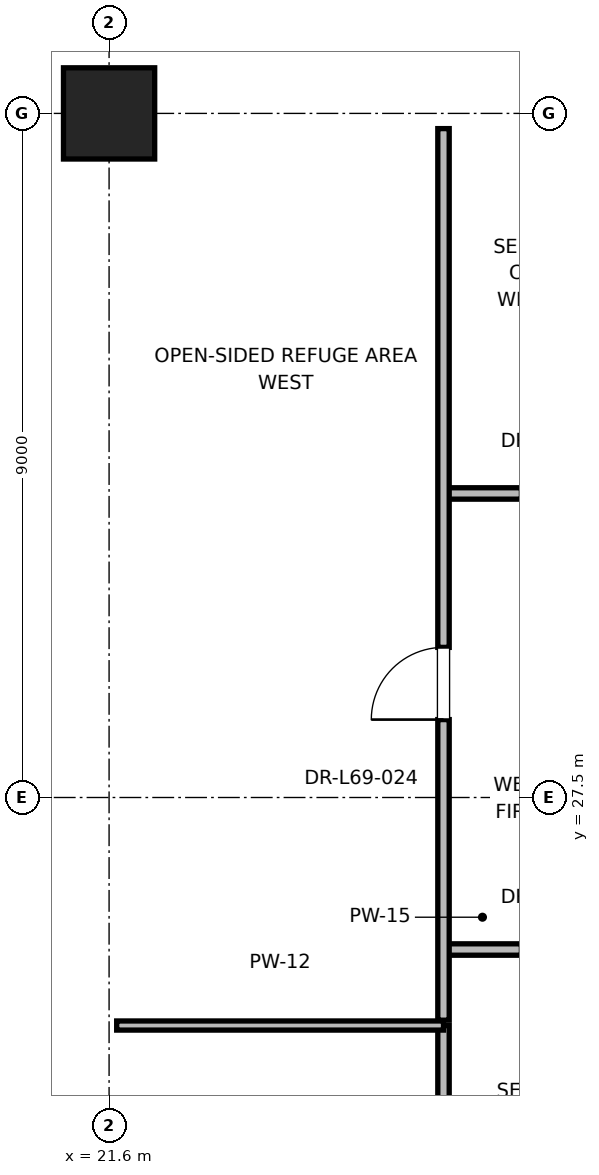
"""IFC4 building model, lengths in metres.
Left out: names, types, materials, properties, quantities, classifications, styles, units other than length and angle.
Written with IfcOpenShell. Run it as: python <this file> out.ifc"""

import sys

from ifc_helpers import new_model, si_unit, direction, frame, frame_2d, origin, origin_2d, place, context, subcontext, project, spatial, rectangle, extrude, element, fill, save


model = new_model("IFC4")
c1 = context("Model", 3, precision=1e-05, world=origin(), true_north=direction((0.0, 1.0)))
c2 = subcontext(c1, "Body", "Model", "MODEL_VIEW")
j1 = project(units=[si_unit("LENGTHUNIT", "METRE"), si_unit("PLANEANGLEUNIT", "RADIAN")], contexts=[c1])
p1 = place(None, origin())
s1 = spatial("IfcSite", under=j1, at=p1, CompositionType="ELEMENT")
p2 = place(p1, origin())
s2 = spatial("IfcBuilding", under=s1, at=p2, CompositionType="ELEMENT")
p3 = place(p2, frame((0.0, 0.0, 295.2)))
s3 = spatial("IfcBuildingStorey", under=s2, at=p3, CompositionType="ELEMENT", Elevation=295.2)
p4 = place(p3, frame((21.6, 36.5, 0.0), z_axis=(0.0, 0.0, 1.0), x_axis=(1.0, 0.0, 0.0)))
e1 = element("IfcColumn", 1, at=p4, inside=s3, PredefinedType="COLUMN", context=c2, shape_type="SweptSolid", body=[
    extrude(rectangle(XDim=1.2, YDim=1.2, at=origin_2d()), origin(), (0.0, 0.0, 1.0), 5.8),
])
p5 = place(p3, frame((26.0, 25.5, 0.0), z_axis=(0.0, 0.0, 1.0), x_axis=(1.0, 0.0, 0.0)))
e2 = element("IfcWall", 2, at=p5, inside=s3, PredefinedType="PARTITIONING", context=c2, shape_type="SweptSolid", body=[
    extrude(rectangle(XDim=3.0, YDim=0.15, at=frame_2d((1.5, 0.0))), origin(), (0.0, 0.0, 1.0), 2.85),
])
p6 = place(p5, frame((1.025, 0.0, 0.0)))
e3 = element("IfcOpeningElement", 3, at=p6, cuts=e2, PredefinedType="OPENING", context=c2, shape_type="SweptSolid", body=[
    extrude(rectangle(XDim=0.95, YDim=2.15, at=frame_2d((0.475, 1.075))), frame((0.0, 0.075, 0.0), z_axis=(0.0, -1.0, 0.0), x_axis=(1.0, 0.0, 0.0)), (0.0, 0.0, 1.0), 0.15),
])
p7 = place(p3, frame((26.0, 31.5, 0.0), z_axis=(0.0, 0.0, 1.0), x_axis=(1.0, 0.0, 0.0)))
e4 = element("IfcWall", 4, at=p7, inside=s3, PredefinedType="PARTITIONING", context=c2, shape_type="SweptSolid", body=[
    extrude(rectangle(XDim=3.0, YDim=0.15, at=frame_2d((1.5, 0.0))), origin(), (0.0, 0.0, 1.0), 2.85),
])
p8 = place(p7, frame((1.025, 0.0, 0.0)))
e5 = element("IfcOpeningElement", 5, at=p8, cuts=e4, PredefinedType="OPENING", context=c2, shape_type="SweptSolid", body=[
    extrude(rectangle(XDim=0.95, YDim=2.15, at=frame_2d((0.475, 1.075))), frame((0.0, 0.075, 0.0), z_axis=(0.0, -1.0, 0.0), x_axis=(1.0, 0.0, 0.0)), (0.0, 0.0, 1.0), 0.15),
])
p9 = place(p3, frame((26.0, 18.7, 0.0), z_axis=(0.0, 0.0, 1.0), x_axis=(0.0, 1.0, 0.0)))
e6 = element("IfcWall", 6, at=p9, inside=s3, PredefinedType="PARTITIONING", context=c2, shape_type="SweptSolid", body=[
    extrude(rectangle(XDim=5.8, YDim=0.15, at=frame_2d((2.9, 0.0))), origin(), (0.0, 0.0, 1.0), 2.85),
])
p10 = place(p9, frame((2.065, 0.0, 0.0)))
e7 = element("IfcOpeningElement", 7, at=p10, cuts=e6, PredefinedType="OPENING", context=c2, shape_type="SweptSolid", body=[
    extrude(rectangle(XDim=1.6, YDim=2.25, at=frame_2d((0.8, 1.125))), frame((0.0, 0.075, 0.0), z_axis=(0.0, -1.0, 0.0), x_axis=(1.0, 0.0, 0.0)), (0.0, 0.0, 1.0), 0.15),
])
p11 = place(p3, frame((21.7, 24.5, 0.0), z_axis=(0.0, 0.0, 1.0), x_axis=(1.0, 0.0, 0.0)))
e8 = element("IfcWall", 8, at=p11, inside=s3, PredefinedType="PARTITIONING", context=c2, shape_type="SweptSolid", body=[
    extrude(rectangle(XDim=4.3, YDim=0.12, at=frame_2d((2.15, 0.0))), origin(), (0.0, 0.0, 1.0), 2.85),
])
p12 = place(p3, frame((26.0, 24.57, 0.0), z_axis=(0.0, 0.0, 1.0), x_axis=(0.0, 1.0, 0.0)))
e9 = element("IfcWall", 9, at=p12, inside=s3, PredefinedType="PARTITIONING", context=c2, shape_type="SweptSolid", body=[
    extrude(rectangle(XDim=11.73, YDim=0.15, at=frame_2d((5.865, 0.0))), origin(), (0.0, 0.0, 1.0), 2.85),
])
p13 = place(p12, frame((3.955, 0.0, 0.0)))
e10 = element("IfcOpeningElement", 10, at=p13, cuts=e9, PredefinedType="OPENING", context=c2, shape_type="SweptSolid", body=[
    extrude(rectangle(XDim=0.95, YDim=2.15, at=frame_2d((0.475, 1.075))), frame((0.0, 0.075, 0.0), z_axis=(0.0, -1.0, 0.0), x_axis=(1.0, 0.0, 0.0)), (0.0, 0.0, 1.0), 0.15),
])
p14 = place(p13, origin())
e11 = element("IfcDoor", 11, at=p14, inside=s3, OperationType="SINGLE_SWING_LEFT", PredefinedType="DOOR", context=c2, shape_type="SweptSolid", body=[
    extrude(rectangle(XDim=0.95, YDim=2.15, at=frame_2d((0.475, 1.075))), frame((0.0, 0.025, 0.0), z_axis=(0.0, -1.0, 0.0), x_axis=(1.0, 0.0, 0.0)), (0.0, 0.0, 1.0), 0.05),
])
fill(e10, e11)
save(model, sys.argv[1])
